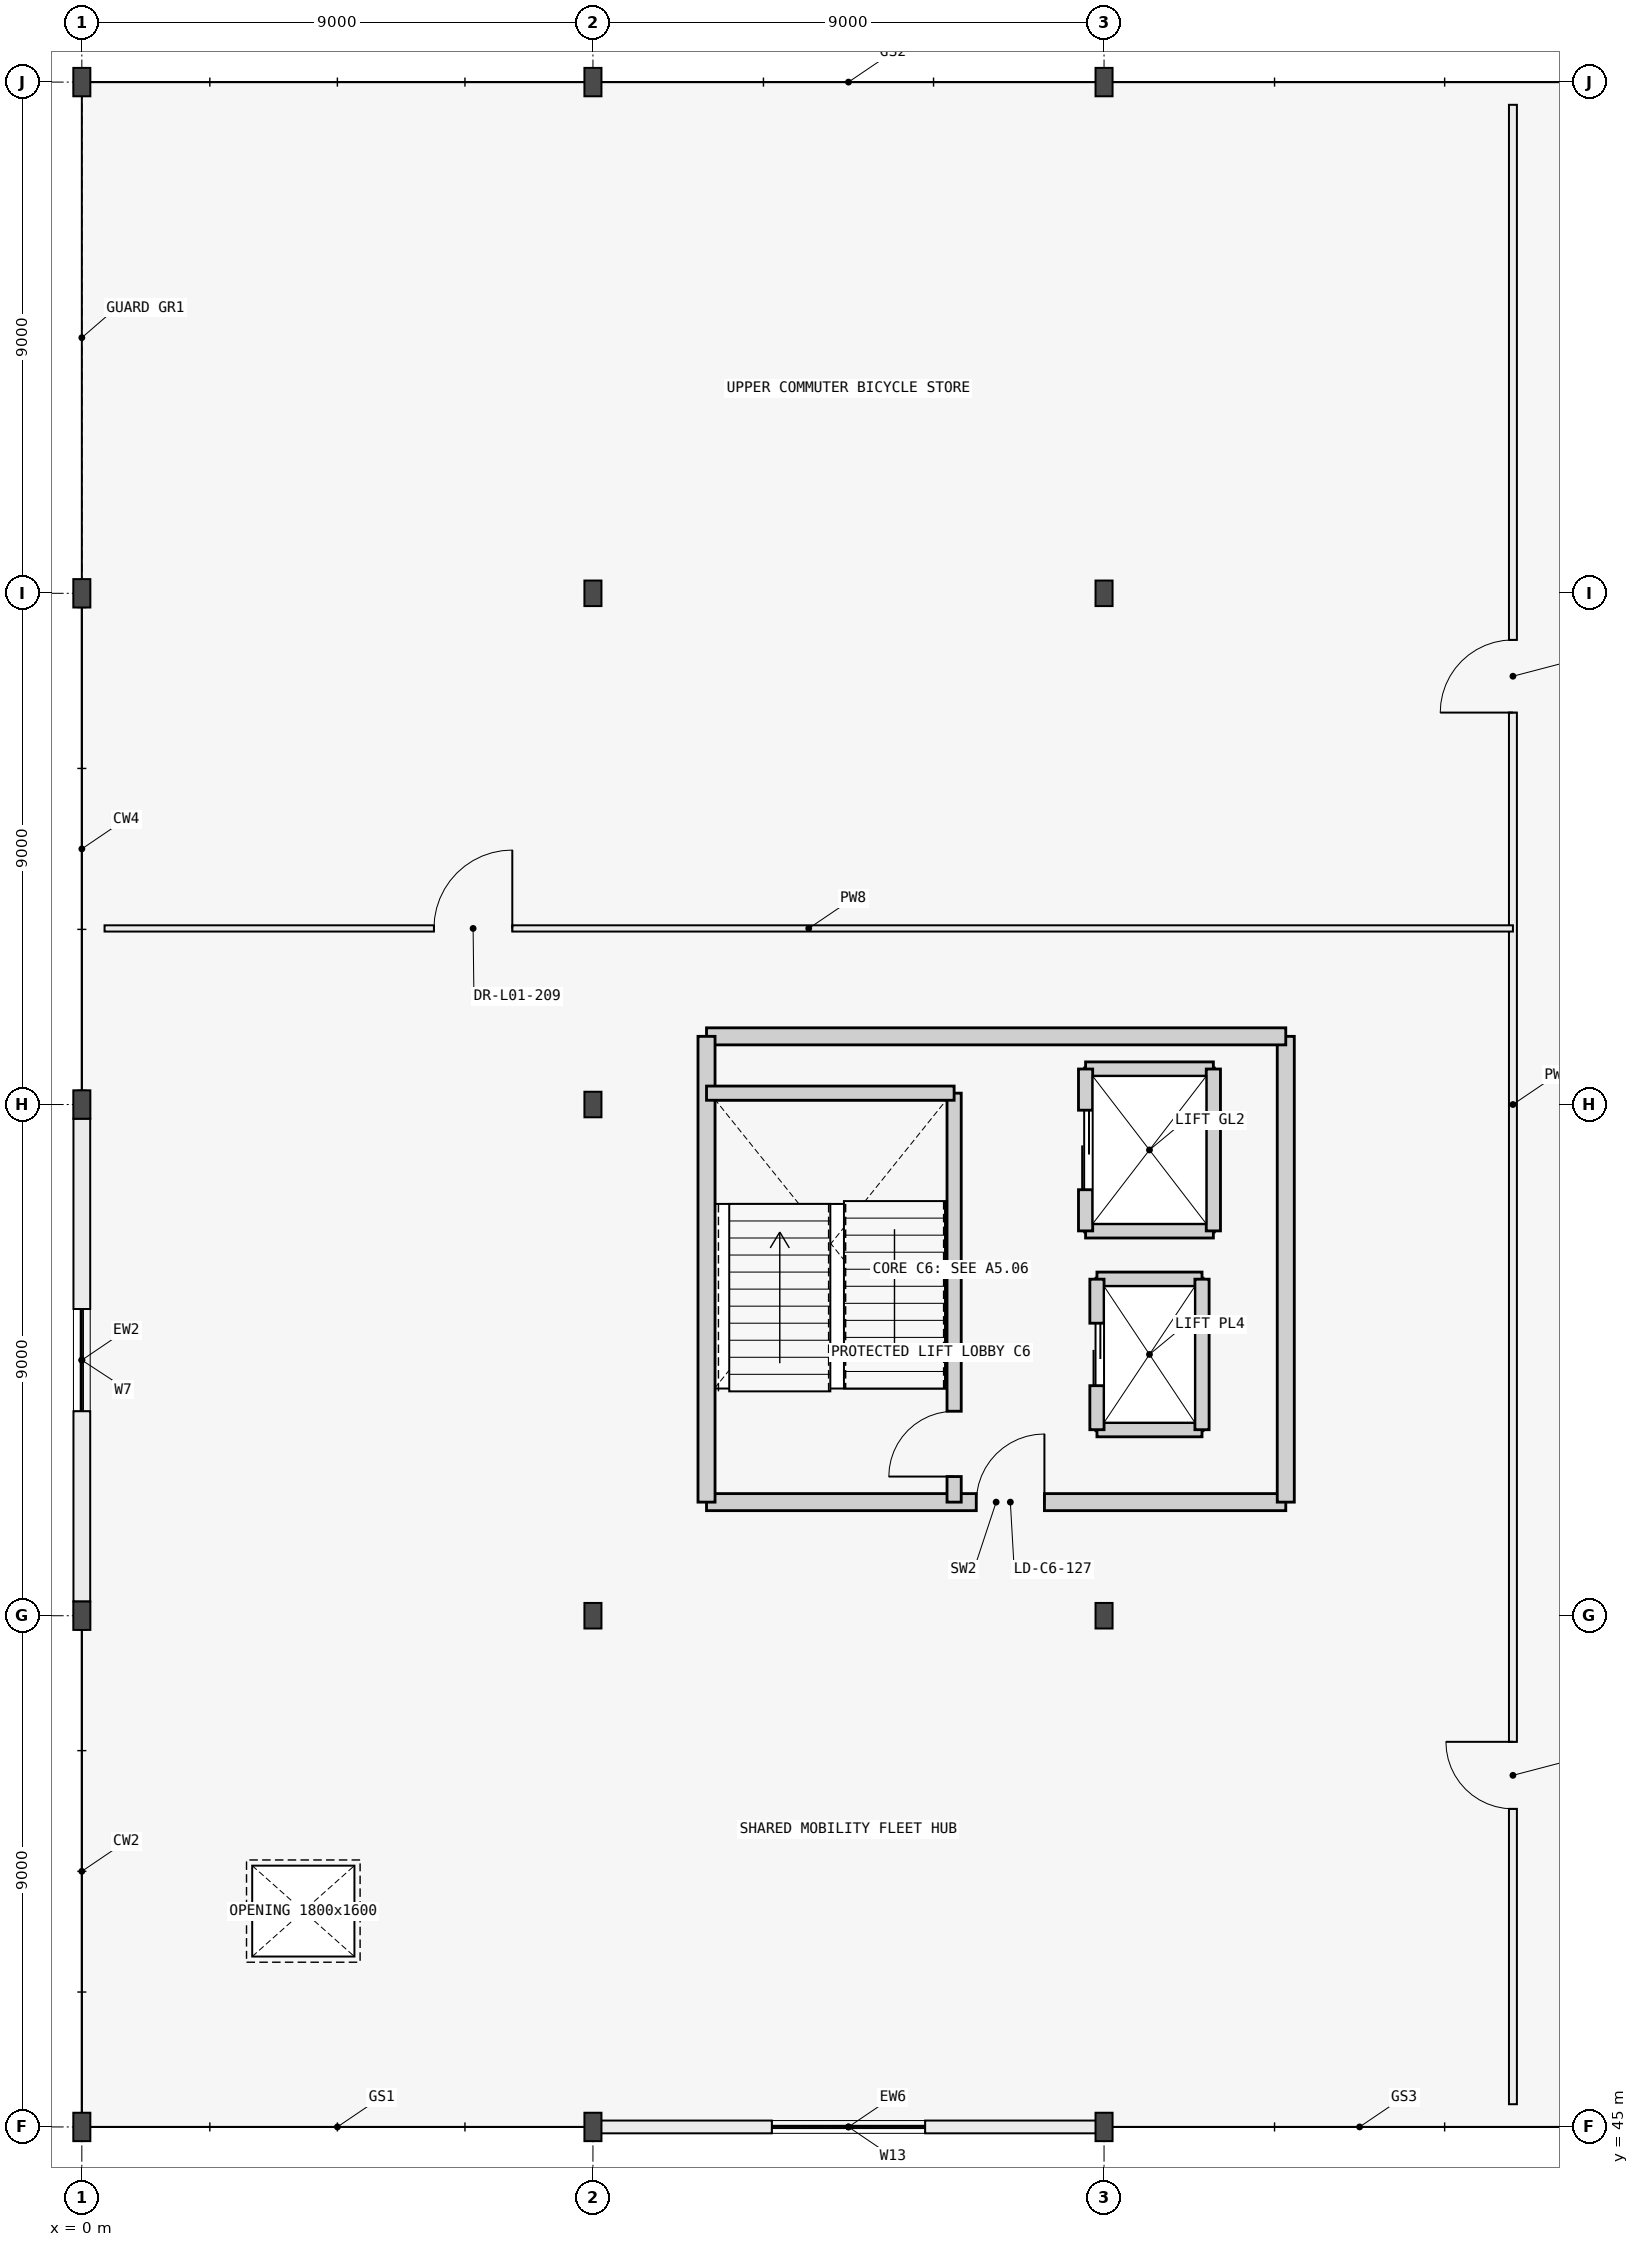
"""IFC4 building model, lengths in metres.
Left out: names, types, materials, properties, quantities, classifications, styles, units other than length and angle.
Written with IfcOpenShell. Run it as: python <this file> out.ifc"""

import sys

from ifc_helpers import new_model, si_unit, direction, frame, frame_2d, origin, origin_2d, place, context, subcontext, project, spatial, rectangle, i_section, extrude, element, fill, save


model = new_model("IFC4")
c1 = context("Model", 3, precision=1e-05, world=origin(), true_north=direction((0.0, 1.0)))
c2 = subcontext(c1, "Body", "Model", "MODEL_VIEW")
j1 = project(units=[si_unit("LENGTHUNIT", "METRE"), si_unit("PLANEANGLEUNIT", "RADIAN")], contexts=[c1])
p1 = place(None, origin())
s1 = spatial("IfcSite", under=j1, at=p1, CompositionType="ELEMENT")
p2 = place(p1, origin())
s2 = spatial("IfcBuilding", under=s1, at=p2, CompositionType="ELEMENT")
p3 = place(p2, frame((0.0, 0.0, 4.2)))
s3 = spatial("IfcBuildingStorey", under=s2, at=p3, CompositionType="ELEMENT", Elevation=4.2)
for number, where, z_axis, x_axis in (
    (1, (0.0, 45.0, 0.0), (0.0, 0.0, 1.0), (1.0, 0.0, 0.0)),
    (2, (9.0, 45.0, 0.0), (0.0, 0.0, 1.0), (1.0, 0.0, 0.0)),
    (3, (18.0, 45.0, 0.0), (0.0, 0.0, 1.0), (1.0, 0.0, 0.0)),
    (4, (0.0, 54.0, 0.0), (0.0, 0.0, 1.0), (1.0, 0.0, 0.0)),
):
    element("IfcColumn", number, at=place(p3, frame(where, z_axis=z_axis, x_axis=x_axis)), inside=s3, PredefinedType="COLUMN", context=c2, shape_type="SweptSolid", body=[
        extrude(i_section(OverallWidth=0.3, OverallDepth=0.5, WebThickness=0.014, FlangeThickness=0.028, FilletRadius=0.027, at=origin_2d()), origin(), (0.0, 0.0, 1.0), 4.2),
    ])
for number, where, z_axis, x_axis in (
    (5, (9.0, 54.0, 0.0), (0.0, 0.0, 1.0), (1.0, 0.0, 0.0)),
    (6, (18.0, 54.0, 0.0), (0.0, 0.0, 1.0), (1.0, 0.0, 0.0)),
):
    element("IfcColumn", number, at=place(p3, frame(where, z_axis=z_axis, x_axis=x_axis)), inside=s3, PredefinedType="COLUMN", context=c2, shape_type="SweptSolid", body=[
        extrude(i_section(OverallWidth=0.3, OverallDepth=0.45, WebThickness=0.014, FlangeThickness=0.026, FilletRadius=0.027, at=origin_2d()), origin(), (0.0, 0.0, 1.0), 4.2),
    ])
p4 = place(p3, frame((0.0, 63.0, 0.0), z_axis=(0.0, 0.0, 1.0), x_axis=(1.0, 0.0, 0.0)))
e7 = element("IfcColumn", 7, at=p4, inside=s3, PredefinedType="COLUMN", context=c2, shape_type="SweptSolid", body=[
    extrude(i_section(OverallWidth=0.3, OverallDepth=0.5, WebThickness=0.014, FlangeThickness=0.028, FilletRadius=0.027, at=origin_2d()), origin(), (0.0, 0.0, 1.0), 4.2),
])
p5 = place(p3, frame((9.0, 63.0, 0.0), z_axis=(0.0, 0.0, 1.0), x_axis=(1.0, 0.0, 0.0)))
e8 = element("IfcColumn", 8, at=p5, inside=s3, PredefinedType="COLUMN", context=c2, shape_type="SweptSolid", body=[
    extrude(i_section(OverallWidth=0.3, OverallDepth=0.45, WebThickness=0.014, FlangeThickness=0.026, FilletRadius=0.027, at=origin_2d()), origin(), (0.0, 0.0, 1.0), 4.2),
])
p6 = place(p3, frame((0.0, 72.0, 0.0), z_axis=(0.0, 0.0, 1.0), x_axis=(1.0, 0.0, 0.0)))
e9 = element("IfcColumn", 9, at=p6, inside=s3, PredefinedType="COLUMN", context=c2, shape_type="SweptSolid", body=[
    extrude(i_section(OverallWidth=0.3, OverallDepth=0.5, WebThickness=0.014, FlangeThickness=0.028, FilletRadius=0.027, at=origin_2d()), origin(), (0.0, 0.0, 1.0), 4.2),
])
for number, where, z_axis, x_axis in (
    (10, (9.0, 72.0, 0.0), (0.0, 0.0, 1.0), (1.0, 0.0, 0.0)),
    (11, (18.0, 72.0, 0.0), (0.0, 0.0, 1.0), (1.0, 0.0, 0.0)),
):
    element("IfcColumn", number, at=place(p3, frame(where, z_axis=z_axis, x_axis=x_axis)), inside=s3, PredefinedType="COLUMN", context=c2, shape_type="SweptSolid", body=[
        extrude(i_section(OverallWidth=0.3, OverallDepth=0.45, WebThickness=0.014, FlangeThickness=0.026, FilletRadius=0.027, at=origin_2d()), origin(), (0.0, 0.0, 1.0), 4.2),
    ])
for number, where, z_axis, x_axis in (
    (12, (0.0, 81.0, 0.0), (0.0, 0.0, 1.0), (1.0, 0.0, 0.0)),
    (13, (9.0, 81.0, 0.0), (0.0, 0.0, 1.0), (1.0, 0.0, 0.0)),
    (14, (18.0, 81.0, 0.0), (0.0, 0.0, 1.0), (1.0, 0.0, 0.0)),
):
    element("IfcColumn", number, at=place(p3, frame(where, z_axis=z_axis, x_axis=x_axis)), inside=s3, PredefinedType="COLUMN", context=c2, shape_type="SweptSolid", body=[
        extrude(i_section(OverallWidth=0.3, OverallDepth=0.5, WebThickness=0.014, FlangeThickness=0.028, FilletRadius=0.027, at=origin_2d()), origin(), (0.0, 0.0, 1.0), 4.2),
    ])
p7 = place(p3, frame((0.0, 54.25, 0.0), z_axis=(0.0, 0.0, 1.0), x_axis=(0.0, 1.0, 0.0)))
e15 = element("IfcWall", 15, at=p7, inside=s3, PredefinedType="STANDARD", context=c2, shape_type="SweptSolid", body=[
    extrude(rectangle(XDim=8.5, YDim=0.295, at=frame_2d((4.25, 0.0))), origin(), (0.0, 0.0, 1.0), 3.62),
])
p8 = place(p7, frame((3.35, 0.0, 0.95)))
e16 = element("IfcOpeningElement", 16, at=p8, cuts=e15, PredefinedType="OPENING", context=c2, shape_type="SweptSolid", body=[
    extrude(rectangle(XDim=1.8, YDim=1.6, at=frame_2d((0.9, 0.8))), frame((0.0, 0.157, 0.0), z_axis=(0.0, -1.0, 0.0), x_axis=(1.0, 0.0, 0.0)), (0.0, 0.0, 1.0), 0.315),
])
p9 = place(p3, frame((9.007, 45.0, 0.0), z_axis=(0.0, 0.0, 1.0), x_axis=(1.0, 0.0, 0.0)))
e17 = element("IfcWall", 17, at=p9, inside=s3, PredefinedType="STANDARD", context=c2, shape_type="SweptSolid", body=[
    extrude(rectangle(XDim=8.986, YDim=0.225, at=frame_2d((4.493, 0.0))), origin(), (0.0, 0.0, 1.0), 3.945),
])
p10 = place(p9, frame((3.143, 0.0, 0.95)))
e18 = element("IfcOpeningElement", 18, at=p10, cuts=e17, PredefinedType="OPENING", context=c2, shape_type="SweptSolid", body=[
    extrude(rectangle(XDim=2.7, YDim=1.6, at=frame_2d((1.35, 0.8))), frame((0.0, 0.123, 0.0), z_axis=(0.0, -1.0, 0.0), x_axis=(1.0, 0.0, 0.0)), (0.0, 0.0, 1.0), 0.245),
])
p11 = place(p3, frame((11.0, 56.0, 0.0), z_axis=(0.0, 0.0, 1.0), x_axis=(1.0, 0.0, 0.0)))
e19 = element("IfcWall", 19, at=p11, inside=s3, PredefinedType="SHEAR", context=c2, shape_type="SweptSolid", body=[
    extrude(rectangle(XDim=10.2, YDim=0.3, at=frame_2d((5.1, 0.0))), origin(), (0.0, 0.0, 1.0), 3.945),
])
p12 = place(p11, frame((4.75, 0.0, 0.0)))
e20 = element("IfcOpeningElement", 20, at=p12, cuts=e19, PredefinedType="OPENING", context=c2, shape_type="SweptSolid", body=[
    extrude(rectangle(XDim=1.2, YDim=2.15, at=frame_2d((0.6, 1.075))), frame((0.0, 0.16, 0.0), z_axis=(0.0, -1.0, 0.0), x_axis=(1.0, 0.0, 0.0)), (0.0, 0.0, 1.0), 0.32),
])
p13 = place(p3, frame((21.2, 56.0, 0.0), z_axis=(0.0, 0.0, 1.0), x_axis=(0.0, 1.0, 0.0)))
e21 = element("IfcWall", 21, at=p13, inside=s3, PredefinedType="SHEAR", context=c2, shape_type="SweptSolid", body=[
    extrude(rectangle(XDim=8.2, YDim=0.3, at=frame_2d((4.1, 0.0))), origin(), (0.0, 0.0, 1.0), 3.945),
])
p14 = place(p3, frame((21.2, 64.2, 0.0), z_axis=(0.0, 0.0, 1.0), x_axis=(-1.0, 0.0, 0.0)))
e22 = element("IfcWall", 22, at=p14, inside=s3, PredefinedType="SHEAR", context=c2, shape_type="SweptSolid", body=[
    extrude(rectangle(XDim=10.2, YDim=0.3, at=frame_2d((5.1, 0.0))), origin(), (0.0, 0.0, 1.0), 3.945),
])
p15 = place(p3, frame((11.0, 64.2, 0.0), z_axis=(0.0, 0.0, 1.0), x_axis=(0.0, -1.0, 0.0)))
e23 = element("IfcWall", 23, at=p15, inside=s3, PredefinedType="SHEAR", context=c2, shape_type="SweptSolid", body=[
    extrude(rectangle(XDim=8.2, YDim=0.3, at=frame_2d((4.1, 0.0))), origin(), (0.0, 0.0, 1.0), 3.945),
])
p16 = place(p3, frame((15.36, 56.0, 0.0), z_axis=(0.0, 0.0, 1.0), x_axis=(0.0, 1.0, 0.0)))
e24 = element("IfcWall", 24, at=p16, inside=s3, PredefinedType="SHEAR", context=c2, shape_type="SweptSolid", body=[
    extrude(rectangle(XDim=7.2, YDim=0.25, at=frame_2d((3.6, 0.0))), origin(), (0.0, 0.0, 1.0), 3.945),
])
p17 = place(p16, frame((0.45, 0.0, 0.0)))
e25 = element("IfcOpeningElement", 25, at=p17, cuts=e24, PredefinedType="OPENING", context=c2, shape_type="SweptSolid", body=[
    extrude(rectangle(XDim=1.15, YDim=2.15, at=frame_2d((0.575, 1.075))), frame((0.0, 0.135, 0.0), z_axis=(0.0, -1.0, 0.0), x_axis=(1.0, 0.0, 0.0)), (0.0, 0.0, 1.0), 0.27),
])
p18 = place(p3, frame((11.0, 63.2, 0.0), z_axis=(0.0, 0.0, 1.0), x_axis=(1.0, 0.0, 0.0)))
e26 = element("IfcWall", 26, at=p18, inside=s3, PredefinedType="SHEAR", context=c2, shape_type="SweptSolid", body=[
    extrude(rectangle(XDim=4.36, YDim=0.25, at=frame_2d((2.18, 0.0))), origin(), (0.0, 0.0, 1.0), 3.945),
])
for number, where, z_axis, x_axis in (
    (27, (17.875, 57.275, 0.0), (0.0, 0.0, 1.0), (1.0, 0.0, 0.0)),
    (28, (17.875, 59.925, 0.0), (0.0, 0.0, 1.0), (1.0, 0.0, 0.0)),
):
    element("IfcWall", number, at=place(p3, frame(where, z_axis=z_axis, x_axis=x_axis)), inside=s3, PredefinedType="SHEAR", context=c2, shape_type="SweptSolid", body=[
        extrude(rectangle(XDim=1.85, YDim=0.25, at=frame_2d((0.925, 0.0))), origin(), (0.0, 0.0, 1.0), 3.945),
    ])
p19 = place(p3, frame((19.725, 57.275, 0.0), z_axis=(0.0, 0.0, 1.0), x_axis=(0.0, 1.0, 0.0)))
e29 = element("IfcWall", 29, at=p19, inside=s3, PredefinedType="SHEAR", context=c2, shape_type="SweptSolid", body=[
    extrude(rectangle(XDim=2.65, YDim=0.25, at=frame_2d((1.325, 0.0))), origin(), (0.0, 0.0, 1.0), 3.945),
])
p20 = place(p3, frame((17.875, 57.275, 0.0), z_axis=(0.0, 0.0, 1.0), x_axis=(0.0, 1.0, 0.0)))
e30 = element("IfcWall", 30, at=p20, inside=s3, PredefinedType="SHEAR", context=c2, shape_type="SweptSolid", body=[
    extrude(rectangle(XDim=2.65, YDim=0.25, at=frame_2d((1.325, 0.0))), origin(), (0.0, 0.0, 1.0), 3.945),
])
p21 = place(p20, frame((0.775, 0.0, 0.0)))
e31 = element("IfcOpeningElement", 31, at=p21, cuts=e30, PredefinedType="OPENING", context=c2, shape_type="SweptSolid", body=[
    extrude(rectangle(XDim=1.1, YDim=2.15, at=frame_2d((0.55, 1.075))), frame((0.0, 0.135, 0.0), z_axis=(0.0, -1.0, 0.0), x_axis=(1.0, 0.0, 0.0)), (0.0, 0.0, 1.0), 0.27),
])
for number, where, z_axis, x_axis in (
    (32, (17.675, 60.775, 0.0), (0.0, 0.0, 1.0), (1.0, 0.0, 0.0)),
    (33, (17.675, 63.625, 0.0), (0.0, 0.0, 1.0), (1.0, 0.0, 0.0)),
):
    element("IfcWall", number, at=place(p3, frame(where, z_axis=z_axis, x_axis=x_axis)), inside=s3, PredefinedType="SHEAR", context=c2, shape_type="SweptSolid", body=[
        extrude(rectangle(XDim=2.25, YDim=0.25, at=frame_2d((1.125, 0.0))), origin(), (0.0, 0.0, 1.0), 3.945),
    ])
p22 = place(p3, frame((19.925, 60.775, 0.0), z_axis=(0.0, 0.0, 1.0), x_axis=(0.0, 1.0, 0.0)))
e34 = element("IfcWall", 34, at=p22, inside=s3, PredefinedType="SHEAR", context=c2, shape_type="SweptSolid", body=[
    extrude(rectangle(XDim=2.85, YDim=0.25, at=frame_2d((1.425, 0.0))), origin(), (0.0, 0.0, 1.0), 3.945),
])
p23 = place(p3, frame((17.675, 60.775, 0.0), z_axis=(0.0, 0.0, 1.0), x_axis=(0.0, 1.0, 0.0)))
e35 = element("IfcWall", 35, at=p23, inside=s3, PredefinedType="SHEAR", context=c2, shape_type="SweptSolid", body=[
    extrude(rectangle(XDim=2.85, YDim=0.25, at=frame_2d((1.425, 0.0))), origin(), (0.0, 0.0, 1.0), 3.945),
])
p24 = place(p23, frame((0.725, 0.0, 0.0)))
e36 = element("IfcOpeningElement", 36, at=p24, cuts=e35, PredefinedType="OPENING", context=c2, shape_type="SweptSolid", body=[
    extrude(rectangle(XDim=1.4, YDim=2.2, at=frame_2d((0.7, 1.1))), frame((0.0, 0.135, 0.0), z_axis=(0.0, -1.0, 0.0), x_axis=(1.0, 0.0, 0.0)), (0.0, 0.0, 1.0), 0.27),
])
p25 = place(p3, frame((25.2, 45.4, 0.0), z_axis=(0.0, 0.0, 1.0), x_axis=(0.0, 1.0, 0.0)))
e37 = element("IfcWall", 37, at=p25, inside=s3, PredefinedType="PARTITIONING", context=c2, shape_type="SweptSolid", body=[
    extrude(rectangle(XDim=35.2, YDim=0.14, at=frame_2d((17.6, 0.0))), origin(), (0.0, 0.0, 1.0), 3.945),
])
p26 = place(p25, frame((5.2, 0.0, 0.0)))
e38 = element("IfcOpeningElement", 38, at=p26, cuts=e37, PredefinedType="OPENING", context=c2, shape_type="SweptSolid", body=[
    extrude(rectangle(XDim=1.18, YDim=2.15, at=frame_2d((0.59, 1.075))), frame((0.0, 0.08, 0.0), z_axis=(0.0, -1.0, 0.0), x_axis=(1.0, 0.0, 0.0)), (0.0, 0.0, 1.0), 0.16),
])
p27 = place(p25, frame((24.5, 0.0, 0.0)))
e39 = element("IfcOpeningElement", 39, at=p27, cuts=e37, PredefinedType="OPENING", context=c2, shape_type="SweptSolid", body=[
    extrude(rectangle(XDim=1.28, YDim=2.18, at=frame_2d((0.64, 1.09))), frame((0.0, 0.08, 0.0), z_axis=(0.0, -1.0, 0.0), x_axis=(1.0, 0.0, 0.0)), (0.0, 0.0, 1.0), 0.16),
])
p28 = place(p3, frame((0.4, 66.1, 0.0), z_axis=(0.0, 0.0, 1.0), x_axis=(1.0, 0.0, 0.0)))
e40 = element("IfcWall", 40, at=p28, inside=s3, PredefinedType="PARTITIONING", context=c2, shape_type="SweptSolid", body=[
    extrude(rectangle(XDim=24.8, YDim=0.11, at=frame_2d((12.4, 0.0))), origin(), (0.0, 0.0, 1.0), 3.945),
])
p29 = place(p28, frame((5.8, 0.0, 0.0)))
e41 = element("IfcOpeningElement", 41, at=p29, cuts=e40, PredefinedType="OPENING", context=c2, shape_type="SweptSolid", body=[
    extrude(rectangle(XDim=1.38, YDim=2.2, at=frame_2d((0.69, 1.1))), frame((0.0, 0.065, 0.0), z_axis=(0.0, -1.0, 0.0), x_axis=(1.0, 0.0, 0.0)), (0.0, 0.0, 1.0), 0.13),
])
p30 = place(p8, origin())
e42 = element("IfcWindow", 42, at=p30, inside=s3, PartitioningType="SINGLE_PANEL", PredefinedType="WINDOW", context=c2, shape_type="SweptSolid", body=[
    extrude(rectangle(XDim=1.8, YDim=1.6, at=frame_2d((0.9, 0.8))), frame((0.0, 0.03, 0.0), z_axis=(0.0, -1.0, 0.0), x_axis=(1.0, 0.0, 0.0)), (0.0, 0.0, 1.0), 0.06),
])
fill(e16, e42)
p31 = place(p10, origin())
e43 = element("IfcWindow", 43, at=p31, inside=s3, PartitioningType="SINGLE_PANEL", PredefinedType="WINDOW", context=c2, shape_type="SweptSolid", body=[
    extrude(rectangle(XDim=2.7, YDim=1.6, at=frame_2d((1.35, 0.8))), frame((0.0, 0.03, 0.0), z_axis=(0.0, -1.0, 0.0), x_axis=(1.0, 0.0, 0.0)), (0.0, 0.0, 1.0), 0.06),
])
fill(e18, e43)
p32 = place(p17, origin())
e44 = element("IfcDoor", 44, at=p32, inside=s3, OperationType="SINGLE_SWING_LEFT", PredefinedType="DOOR", context=c2, shape_type="SweptSolid", body=[
    extrude(rectangle(XDim=1.15, YDim=2.15, at=frame_2d((0.575, 1.075))), frame((0.0, 0.025, 0.0), z_axis=(0.0, -1.0, 0.0), x_axis=(1.0, 0.0, 0.0)), (0.0, 0.0, 1.0), 0.05),
])
fill(e25, e44)
p33 = place(p12, origin())
e45 = element("IfcDoor", 45, at=p33, inside=s3, OperationType="SINGLE_SWING_RIGHT", PredefinedType="DOOR", context=c2, shape_type="SweptSolid", body=[
    extrude(rectangle(XDim=1.2, YDim=2.15, at=frame_2d((0.6, 1.075))), frame((0.0, 0.025, 0.0), z_axis=(0.0, -1.0, 0.0), x_axis=(1.0, 0.0, 0.0)), (0.0, 0.0, 1.0), 0.05),
])
fill(e20, e45)
p34 = place(p21, origin())
e46 = element("IfcDoor", 46, at=p34, inside=s3, OperationType="DOUBLE_DOOR_SLIDING", PredefinedType="USERDEFINED", context=c2, shape_type="SweptSolid", body=[
    extrude(rectangle(XDim=1.1, YDim=2.15, at=frame_2d((0.55, 1.075))), frame((0.0, 0.025, 0.0), z_axis=(0.0, -1.0, 0.0), x_axis=(1.0, 0.0, 0.0)), (0.0, 0.0, 1.0), 0.05),
])
fill(e31, e46)
p35 = place(p24, origin())
e47 = element("IfcDoor", 47, at=p35, inside=s3, OperationType="DOUBLE_DOOR_SLIDING", PredefinedType="USERDEFINED", context=c2, shape_type="SweptSolid", body=[
    extrude(rectangle(XDim=1.4, YDim=2.2, at=frame_2d((0.7, 1.1))), frame((0.0, 0.025, 0.0), z_axis=(0.0, -1.0, 0.0), x_axis=(1.0, 0.0, 0.0)), (0.0, 0.0, 1.0), 0.05),
])
fill(e36, e47)
p36 = place(p26, origin())
e48 = element("IfcDoor", 48, at=p36, inside=s3, OperationType="SINGLE_SWING_RIGHT", PredefinedType="DOOR", context=c2, shape_type="SweptSolid", body=[
    extrude(rectangle(XDim=1.18, YDim=2.15, at=frame_2d((0.59, 1.075))), frame((0.0, 0.025, 0.0), z_axis=(0.0, -1.0, 0.0), x_axis=(1.0, 0.0, 0.0)), (0.0, 0.0, 1.0), 0.05),
])
fill(e38, e48)
p37 = place(p27, origin())
e49 = element("IfcDoor", 49, at=p37, inside=s3, OperationType="SINGLE_SWING_LEFT", PredefinedType="DOOR", context=c2, shape_type="SweptSolid", body=[
    extrude(rectangle(XDim=1.28, YDim=2.18, at=frame_2d((0.64, 1.09))), frame((0.0, 0.025, 0.0), z_axis=(0.0, -1.0, 0.0), x_axis=(1.0, 0.0, 0.0)), (0.0, 0.0, 1.0), 0.05),
])
fill(e39, e49)
p38 = place(p29, origin())
e50 = element("IfcDoor", 50, at=p38, inside=s3, OperationType="SINGLE_SWING_RIGHT", PredefinedType="DOOR", context=c2, shape_type="SweptSolid", body=[
    extrude(rectangle(XDim=1.38, YDim=2.2, at=frame_2d((0.69, 1.1))), frame((0.0, 0.025, 0.0), z_axis=(0.0, -1.0, 0.0), x_axis=(1.0, 0.0, 0.0)), (0.0, 0.0, 1.0), 0.05),
])
fill(e41, e50)
save(model, sys.argv[1])
